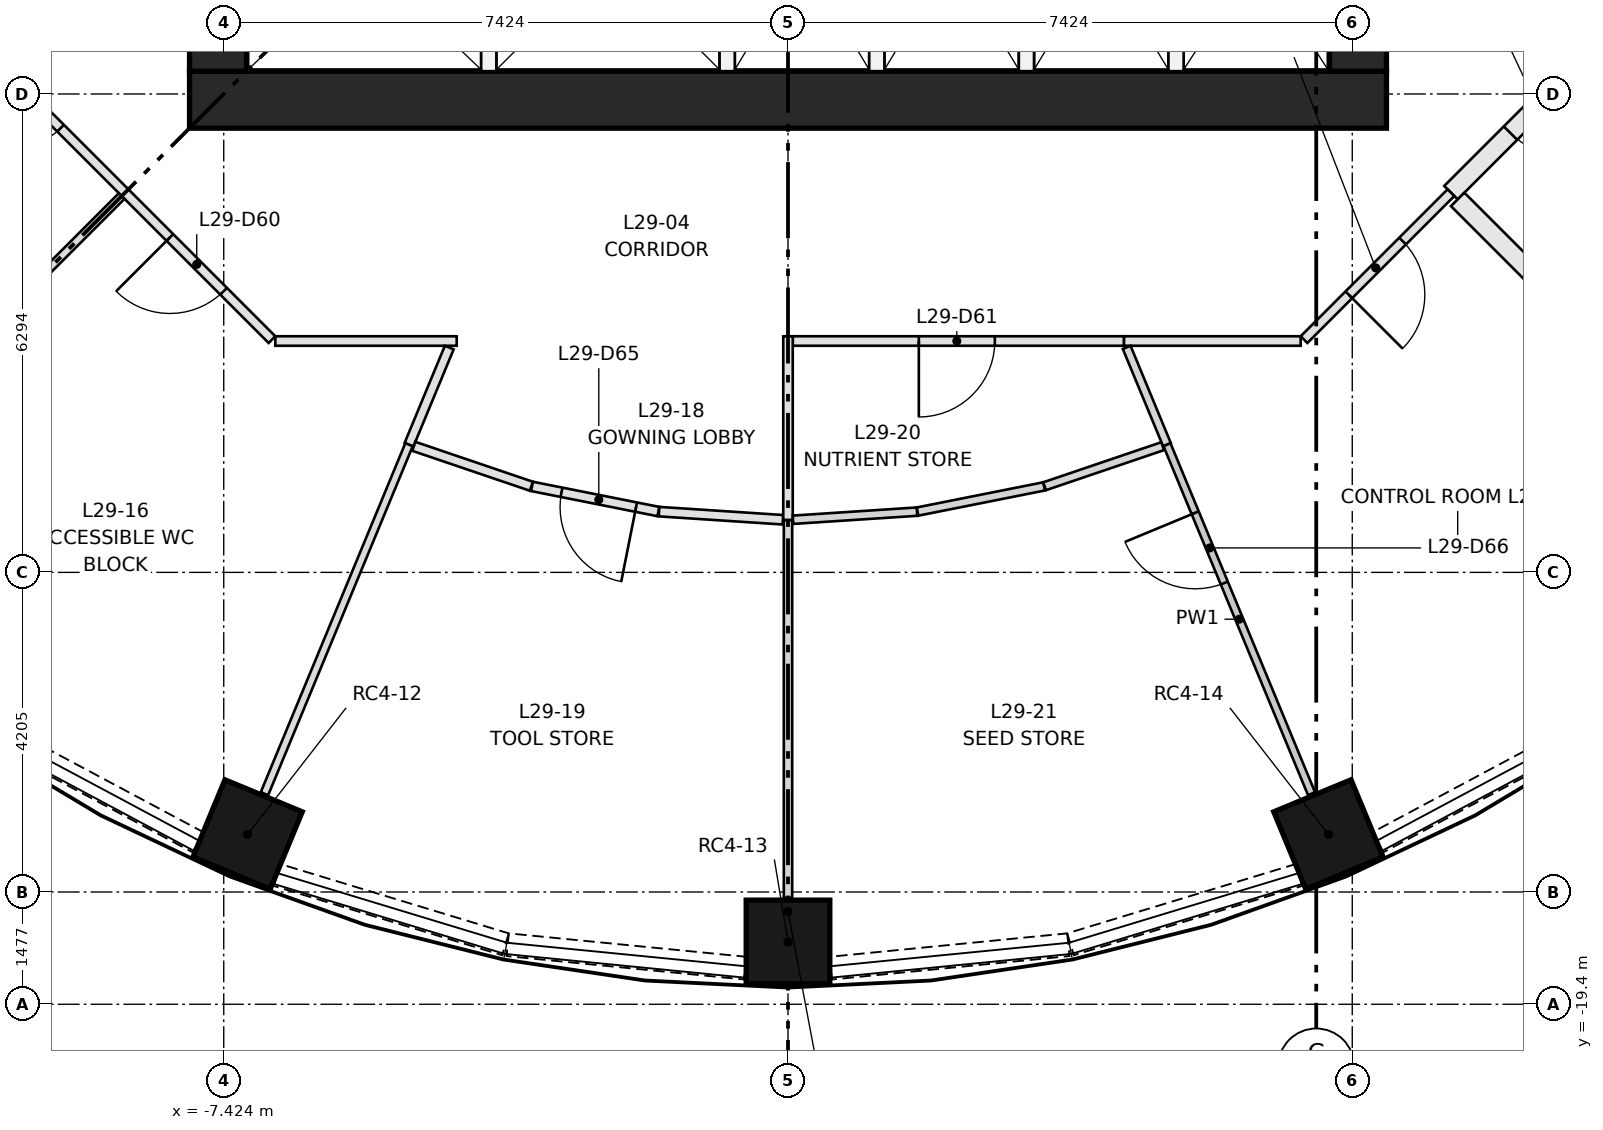
"""IFC4 building model, lengths in metres.
Left out: names, types, materials, properties, quantities, classifications, styles, units other than length and angle.
Written with IfcOpenShell. Run it as: python <this file> out.ifc"""

import sys

from ifc_helpers import new_model, si_unit, direction, frame, frame_2d, origin, origin_2d, place, context, subcontext, project, spatial, rectangle, extrude, element, fill, save


model = new_model("IFC4")
c1 = context("Model", 3, precision=1e-05, world=origin(), true_north=direction((0.0, 1.0)))
c2 = subcontext(c1, "Body", "Model", "MODEL_VIEW")
j1 = project(units=[si_unit("LENGTHUNIT", "METRE"), si_unit("PLANEANGLEUNIT", "RADIAN")], contexts=[c1])
p1 = place(None, origin())
s1 = spatial("IfcSite", under=j1, at=p1, CompositionType="ELEMENT")
p2 = place(p1, origin())
s2 = spatial("IfcBuilding", under=s1, at=p2, CompositionType="ELEMENT")
p3 = place(p2, frame((0.0, 0.0, 112.9)))
s3 = spatial("IfcBuildingStorey", under=s2, at=p3, CompositionType="ELEMENT", Elevation=112.9)
for number, where, z_axis, x_axis in (
    (1, (-7.11, -17.166, 0.0), (0.0, 0.0, 1.0), (-0.383, -0.924, 0.0)),
    (2, (0.0, -18.58, 0.0), (0.0, 0.0, 1.0), (0.0, -1.0, 0.0)),
    (3, (7.11, -17.166, 0.0), (0.0, 0.0, 1.0), (0.383, -0.924, 0.0)),
):
    element("IfcColumn", number, at=place(p3, frame(where, z_axis=z_axis, x_axis=x_axis)), inside=s3, PredefinedType="COLUMN", context=c2, shape_type="SweptSolid", body=[
        extrude(rectangle(XDim=1.1, YDim=1.1, at=origin_2d()), origin(), (0.0, 0.0, 1.0), 3.65),
    ])
p4 = place(p3, frame((-7.874, -7.499, 0.0), z_axis=(0.0, 0.0, 1.0), x_axis=(1.0, 0.0, 0.0)))
e4 = element("IfcWall", 4, at=p4, inside=s3, PredefinedType="SHEAR", context=c2, shape_type="SweptSolid", body=[
    extrude(rectangle(XDim=15.748, YDim=0.75, at=frame_2d((7.874, 0.0))), origin(), (0.0, 0.0, 1.0), 3.65),
])
p5 = place(p3, frame((-7.499, -7.124, 0.0), z_axis=(0.0, 0.0, 1.0), x_axis=(0.0, 1.0, 0.0)))
e5 = element("IfcWall", 5, at=p5, inside=s3, PredefinedType="SHEAR", context=c2, shape_type="SweptSolid", body=[
    extrude(rectangle(XDim=14.248, YDim=0.75, at=frame_2d((7.124, 0.0))), origin(), (0.0, 0.0, 1.0), 3.65),
])
p6 = place(p5, frame((6.624, 0.0, 0.0)))
e6 = element("IfcOpeningElement", 6, at=p6, cuts=e5, PredefinedType="OPENING", context=c2, shape_type="SweptSolid", body=[
    extrude(rectangle(XDim=1.0, YDim=2.1, at=frame_2d((0.5, 1.05))), frame((0.0, 0.385, 0.0), z_axis=(0.0, -1.0, 0.0), x_axis=(1.0, 0.0, 0.0)), (0.0, 0.0, 1.0), 0.77),
])
p7 = place(p5, frame((3.5, 0.0, 0.0)))
e7 = element("IfcOpeningElement", 7, at=p7, cuts=e5, PredefinedType="OPENING", context=c2, shape_type="SweptSolid", body=[
    extrude(rectangle(XDim=1.8, YDim=2.1, at=frame_2d((0.9, 1.05))), frame((0.0, 0.385, 0.0), z_axis=(0.0, -1.0, 0.0), x_axis=(1.0, 0.0, 0.0)), (0.0, 0.0, 1.0), 0.77),
])
p8 = place(p5, frame((8.948, 0.0, 0.0)))
e8 = element("IfcOpeningElement", 8, at=p8, cuts=e5, PredefinedType="OPENING", context=c2, shape_type="SweptSolid", body=[
    extrude(rectangle(XDim=1.8, YDim=2.1, at=frame_2d((0.9, 1.05))), frame((0.0, 0.385, 0.0), z_axis=(0.0, -1.0, 0.0), x_axis=(1.0, 0.0, 0.0)), (0.0, 0.0, 1.0), 0.77),
])
p9 = place(p5, frame((12.124, 0.0, 0.0)))
e9 = element("IfcOpeningElement", 9, at=p9, cuts=e5, PredefinedType="OPENING", context=c2, shape_type="SweptSolid", body=[
    extrude(rectangle(XDim=1.0, YDim=2.1, at=frame_2d((0.5, 1.05))), frame((0.0, 0.385, 0.0), z_axis=(0.0, -1.0, 0.0), x_axis=(1.0, 0.0, 0.0)), (0.0, 0.0, 1.0), 0.77),
])
p10 = place(p3, frame((7.499, -7.124, 0.0), z_axis=(0.0, 0.0, 1.0), x_axis=(0.0, 1.0, 0.0)))
e10 = element("IfcWall", 10, at=p10, inside=s3, PredefinedType="SHEAR", context=c2, shape_type="SweptSolid", body=[
    extrude(rectangle(XDim=14.248, YDim=0.75, at=frame_2d((7.124, 0.0))), origin(), (0.0, 0.0, 1.0), 3.65),
])
p11 = place(p10, frame((6.624, 0.0, 0.0)))
e11 = element("IfcOpeningElement", 11, at=p11, cuts=e10, PredefinedType="OPENING", context=c2, shape_type="SweptSolid", body=[
    extrude(rectangle(XDim=1.0, YDim=2.1, at=frame_2d((0.5, 1.05))), frame((0.0, 0.385, 0.0), z_axis=(0.0, -1.0, 0.0), x_axis=(1.0, 0.0, 0.0)), (0.0, 0.0, 1.0), 0.77),
])
p12 = place(p10, frame((3.5, 0.0, 0.0)))
e12 = element("IfcOpeningElement", 12, at=p12, cuts=e10, PredefinedType="OPENING", context=c2, shape_type="SweptSolid", body=[
    extrude(rectangle(XDim=1.8, YDim=2.1, at=frame_2d((0.9, 1.05))), frame((0.0, 0.385, 0.0), z_axis=(0.0, -1.0, 0.0), x_axis=(1.0, 0.0, 0.0)), (0.0, 0.0, 1.0), 0.77),
])
p13 = place(p10, frame((8.948, 0.0, 0.0)))
e13 = element("IfcOpeningElement", 13, at=p13, cuts=e10, PredefinedType="OPENING", context=c2, shape_type="SweptSolid", body=[
    extrude(rectangle(XDim=1.8, YDim=2.1, at=frame_2d((0.9, 1.05))), frame((0.0, 0.385, 0.0), z_axis=(0.0, -1.0, 0.0), x_axis=(1.0, 0.0, 0.0)), (0.0, 0.0, 1.0), 0.77),
])
for number, where, z_axis, x_axis in (
    (14, (-3.937, -7.124, 0.0), (0.0, 0.0, 1.0), (0.0, 1.0, 0.0)),
    (15, (-0.8, -7.124, 0.0), (0.0, 0.0, 1.0), (0.0, 1.0, 0.0)),
    (16, (1.168, -7.124, 0.0), (0.0, 0.0, 1.0), (0.0, 1.0, 0.0)),
    (17, (3.137, -7.124, 0.0), (0.0, 0.0, 1.0), (0.0, 1.0, 0.0)),
    (18, (5.105, -7.124, 0.0), (0.0, 0.0, 1.0), (0.0, 1.0, 0.0)),
):
    element("IfcWall", number, at=place(p3, frame(where, z_axis=z_axis, x_axis=x_axis)), inside=s3, PredefinedType="PARTITIONING", context=c2, shape_type="SweptSolid", body=[
        extrude(rectangle(XDim=2.95, YDim=0.2, at=frame_2d((1.475, 0.0))), origin(), (0.0, 0.0, 1.0), 3.3),
    ])
p14 = place(p3, frame((-10.532, -15.788, 0.0), z_axis=(0.0, 0.0, 1.0), x_axis=(0.88193278355, -0.471375185282, 0.0)))
e19 = element("IfcWall", 19, at=p14, inside=s3, PredefinedType="SOLIDWALL", context=c2, shape_type="SweptSolid", body=[
    extrude(rectangle(XDim=3.139, YDim=0.3, at=frame_2d((1.57, 0.0))), origin(), (0.0, 0.0, 1.0), 0.9),
])
p15 = place(p3, frame((-6.722, -17.699, 0.0), z_axis=(0.0, 0.0, 1.0), x_axis=(0.956961595403, -0.290214584271, 0.0)))
e20 = element("IfcWall", 20, at=p15, inside=s3, PredefinedType="SOLIDWALL", context=c2, shape_type="SweptSolid", body=[
    extrude(rectangle(XDim=3.139, YDim=0.3, at=frame_2d((1.57, 0.0))), origin(), (0.0, 0.0, 1.0), 0.9),
])
for number, where, z_axis, x_axis in (
    (21, (-3.688, -18.616, 0.0), (0.0, 0.0, 1.0), (0.995, -0.098, 0.0)),
    (22, (0.564, -18.925, 0.0), (0.0, 0.0, 1.0), (0.995, 0.098, 0.0)),
):
    element("IfcWall", number, at=place(p3, frame(where, z_axis=z_axis, x_axis=x_axis)), inside=s3, PredefinedType="SOLIDWALL", context=c2, shape_type="SweptSolid", body=[
        extrude(rectangle(XDim=3.139, YDim=0.3, at=frame_2d((1.57, 0.0))), origin(), (0.0, 0.0, 1.0), 0.9),
    ])
p16 = place(p3, frame((3.717, -18.611, 0.0), z_axis=(0.0, 0.0, 1.0), x_axis=(0.956961595403, 0.290214584271, 0.0)))
e23 = element("IfcWall", 23, at=p16, inside=s3, PredefinedType="SOLIDWALL", context=c2, shape_type="SweptSolid", body=[
    extrude(rectangle(XDim=3.139, YDim=0.3, at=frame_2d((1.57, 0.0))), origin(), (0.0, 0.0, 1.0), 0.9),
])
p17 = place(p3, frame((7.763, -17.268, 0.0), z_axis=(0.0, 0.0, 1.0), x_axis=(0.88193278355, 0.471375185282, 0.0)))
e24 = element("IfcWall", 24, at=p17, inside=s3, PredefinedType="SOLIDWALL", context=c2, shape_type="SweptSolid", body=[
    extrude(rectangle(XDim=3.139, YDim=0.3, at=frame_2d((1.57, 0.0))), origin(), (0.0, 0.0, 1.0), 0.9),
])
p18 = place(p3, frame((10.637, -6.808, 0.0), z_axis=(0.0, 0.0, 1.0), x_axis=(-0.707151855722, -0.707061703777, 0.0)))
e25 = element("IfcWall", 25, at=p18, inside=s3, PredefinedType="PARTITIONING", context=c2, shape_type="SweptSolid", body=[
    extrude(rectangle(XDim=2.708, YDim=0.25, at=frame_2d((1.354, 0.0))), origin(), (0.0, 0.0, 1.0), 3.3),
])
p19 = place(p18, frame((0.6, 0.0, 0.0)))
e26 = element("IfcOpeningElement", 26, at=p19, cuts=e25, PredefinedType="OPENING", context=c2, shape_type="SweptSolid", body=[
    extrude(rectangle(XDim=1.0, YDim=2.1, at=frame_2d((0.5, 1.05))), frame((0.0, 0.135, 0.0), z_axis=(0.0, -1.0, 0.0), x_axis=(1.0, 0.0, 0.0)), (0.0, 0.0, 1.0), 0.27),
])
p20 = place(p3, frame((-8.722, -8.722, 0.0), z_axis=(0.0, 0.0, 1.0), x_axis=(-0.707151428813, 0.707062130741, 0.0)))
e27 = element("IfcWall", 27, at=p20, inside=s3, PredefinedType="PARTITIONING", context=c2, shape_type="SweptSolid", body=[
    extrude(rectangle(XDim=2.734, YDim=0.125, at=frame_2d((1.367, 0.0))), origin(), (0.0, 0.0, 1.0), 3.3),
])
p21 = place(p20, frame((1.2, 0.0, 0.0)))
e28 = element("IfcOpeningElement", 28, at=p21, cuts=e27, PredefinedType="OPENING", context=c2, shape_type="SweptSolid", body=[
    extrude(rectangle(XDim=1.0, YDim=2.1, at=frame_2d((0.5, 1.05))), frame((0.0, 0.073, 0.0), z_axis=(0.0, -1.0, 0.0), x_axis=(1.0, 0.0, 0.0)), (0.0, 0.0, 1.0), 0.145),
])
p22 = place(p3, frame((-6.789, -10.656, 0.0), z_axis=(0.0, 0.0, 1.0), x_axis=(-0.707062130741, 0.707151428813, 0.0)))
e29 = element("IfcWall", 29, at=p22, inside=s3, PredefinedType="PARTITIONING", context=c2, shape_type="SweptSolid", body=[
    extrude(rectangle(XDim=2.734, YDim=0.125, at=frame_2d((1.367, 0.0))), origin(), (0.0, 0.0, 1.0), 3.3),
])
p23 = place(p22, frame((0.9, 0.0, 0.0)))
e30 = element("IfcOpeningElement", 30, at=p23, cuts=e29, PredefinedType="OPENING", context=c2, shape_type="SweptSolid", body=[
    extrude(rectangle(XDim=1.0, YDim=2.1, at=frame_2d((0.5, 1.05))), frame((0.0, 0.073, 0.0), z_axis=(0.0, -1.0, 0.0), x_axis=(1.0, 0.0, 0.0)), (0.0, 0.0, 1.0), 0.145),
])
p24 = place(p3, frame((-4.359, -10.674, 0.0), z_axis=(0.0, 0.0, 1.0), x_axis=(-1.0, 0.0, 0.0)))
e31 = element("IfcWall", 31, at=p24, inside=s3, PredefinedType="PARTITIONING", context=c2, shape_type="SweptSolid", body=[
    extrude(rectangle(XDim=2.386, YDim=0.125, at=frame_2d((1.193, 0.0))), origin(), (0.0, 0.0, 1.0), 3.3),
])
p25 = place(p3, frame((4.421, -10.674, 0.0), z_axis=(0.0, 0.0, 1.0), x_axis=(-1.0, 0.0, 0.0)))
e32 = element("IfcWall", 32, at=p25, inside=s3, PredefinedType="PARTITIONING", context=c2, shape_type="SweptSolid", body=[
    extrude(rectangle(XDim=4.359, YDim=0.125, at=frame_2d((2.179, 0.0))), origin(), (0.0, 0.0, 1.0), 3.3),
])
p26 = place(p25, frame((1.7, 0.0, 0.0)))
e33 = element("IfcOpeningElement", 33, at=p26, cuts=e32, PredefinedType="OPENING", context=c2, shape_type="SweptSolid", body=[
    extrude(rectangle(XDim=1.0, YDim=2.1, at=frame_2d((0.5, 1.05))), frame((0.0, 0.073, 0.0), z_axis=(0.0, -1.0, 0.0), x_axis=(1.0, 0.0, 0.0)), (0.0, 0.0, 1.0), 0.145),
])
p27 = place(p3, frame((6.745, -10.674, 0.0), z_axis=(0.0, 0.0, 1.0), x_axis=(-1.0, 0.0, 0.0)))
e34 = element("IfcWall", 34, at=p27, inside=s3, PredefinedType="PARTITIONING", context=c2, shape_type="SweptSolid", body=[
    extrude(rectangle(XDim=2.324, YDim=0.125, at=frame_2d((1.162, 0.0))), origin(), (0.0, 0.0, 1.0), 3.3),
])
p28 = place(p3, frame((8.722, -8.722, 0.0), z_axis=(0.0, 0.0, 1.0), x_axis=(-0.707062130741, -0.707151428813, 0.0)))
e35 = element("IfcWall", 35, at=p28, inside=s3, PredefinedType="PARTITIONING", context=c2, shape_type="SweptSolid", body=[
    extrude(rectangle(XDim=2.734, YDim=0.125, at=frame_2d((1.367, 0.0))), origin(), (0.0, 0.0, 1.0), 3.3),
])
p29 = place(p28, frame((0.9, 0.0, 0.0)))
e36 = element("IfcOpeningElement", 36, at=p29, cuts=e35, PredefinedType="OPENING", context=c2, shape_type="SweptSolid", body=[
    extrude(rectangle(XDim=1.0, YDim=2.1, at=frame_2d((0.5, 1.05))), frame((0.0, 0.073, 0.0), z_axis=(0.0, -1.0, 0.0), x_axis=(1.0, 0.0, 0.0)), (0.0, 0.0, 1.0), 0.145),
])
p30 = place(p3, frame((-12.728, -12.728, 0.0), z_axis=(0.0, 0.0, 1.0), x_axis=(0.707106781187, 0.707106781187, 0.0)))
e37 = element("IfcWall", 37, at=p30, inside=s3, PredefinedType="PARTITIONING", context=c2, shape_type="SweptSolid", body=[
    extrude(rectangle(XDim=5.602, YDim=0.105, at=frame_2d((2.801, 0.0))), origin(), (0.0, 0.0, 1.0), 3.3),
])
p31 = place(p3, frame((-4.457, -10.76, 0.0), z_axis=(0.0, 0.0, 1.0), x_axis=(-0.382746785562, -0.923853288213, 0.0)))
e38 = element("IfcWall", 38, at=p31, inside=s3, PredefinedType="PARTITIONING", context=c2, shape_type="SweptSolid", body=[
    extrude(rectangle(XDim=1.383, YDim=0.125, at=frame_2d((0.691, 0.0))), origin(), (0.0, 0.0, 1.0), 3.3),
])
p32 = place(p3, frame((-4.986, -12.038, 0.0), z_axis=(0.0, 0.0, 1.0), x_axis=(-0.38266126553, -0.923888714003, 0.0)))
e39 = element("IfcWall", 39, at=p32, inside=s3, PredefinedType="PARTITIONING", context=c2, shape_type="SweptSolid", body=[
    extrude(rectangle(XDim=4.97, YDim=0.105, at=frame_2d((2.485, 0.0))), origin(), (0.0, 0.0, 1.0), 3.3),
])
p33 = place(p3, frame((-3.376, -12.585, 0.0), z_axis=(0.0, 0.0, 1.0), x_axis=(-0.946920220616, 0.321468654442, 0.0)))
e40 = element("IfcWall", 40, at=p33, inside=s3, PredefinedType="PARTITIONING", context=c2, shape_type="SweptSolid", body=[
    extrude(rectangle(XDim=1.634, YDim=0.125, at=frame_2d((0.817, 0.0))), origin(), (0.0, 0.0, 1.0), 3.3),
])
p34 = place(p3, frame((-1.705, -12.918, 0.0), z_axis=(0.0, 0.0, 1.0), x_axis=(-0.980795988991, 0.195036478586, 0.0)))
e41 = element("IfcWall", 41, at=p34, inside=s3, PredefinedType="PARTITIONING", context=c2, shape_type="SweptSolid", body=[
    extrude(rectangle(XDim=1.696, YDim=0.125, at=frame_2d((0.848, 0.0))), origin(), (0.0, 0.0, 1.0), 3.3),
])
p35 = place(p34, frame((0.3, 0.0, 0.0)))
e42 = element("IfcOpeningElement", 42, at=p35, cuts=e41, PredefinedType="OPENING", context=c2, shape_type="SweptSolid", body=[
    extrude(rectangle(XDim=1.0, YDim=2.1, at=frame_2d((0.5, 1.05))), frame((0.0, 0.073, 0.0), z_axis=(0.0, -1.0, 0.0), x_axis=(1.0, 0.0, 0.0)), (0.0, 0.0, 1.0), 0.145),
])
p36 = place(p3, frame((-0.067, -13.026, 0.0), z_axis=(0.0, 0.0, 1.0), x_axis=(-0.997855349109, 0.065457637099, 0.0)))
e43 = element("IfcWall", 43, at=p36, inside=s3, PredefinedType="PARTITIONING", context=c2, shape_type="SweptSolid", body=[
    extrude(rectangle(XDim=1.634, YDim=0.125, at=frame_2d((0.817, 0.0))), origin(), (0.0, 0.0, 1.0), 3.3),
])
p37 = place(p3, frame((0.0, -10.612, 0.0), z_axis=(0.0, 0.0, 1.0), x_axis=(0.0, -1.0, 0.0)))
e44 = element("IfcWall", 44, at=p37, inside=s3, PredefinedType="PARTITIONING", context=c2, shape_type="SweptSolid", body=[
    extrude(rectangle(XDim=2.418, YDim=0.125, at=frame_2d((1.209, 0.0))), origin(), (0.0, 0.0, 1.0), 3.3),
])
p38 = place(p3, frame((0.0, -13.03, 0.0), z_axis=(0.0, 0.0, 1.0), x_axis=(0.0, -1.0, 0.0)))
e45 = element("IfcWall", 45, at=p38, inside=s3, PredefinedType="PARTITIONING", context=c2, shape_type="SweptSolid", body=[
    extrude(rectangle(XDim=4.97, YDim=0.11, at=frame_2d((2.485, 0.0))), origin(), (0.0, 0.0, 1.0), 3.3),
])
p39 = place(p3, frame((1.697, -12.919, 0.0), z_axis=(0.0, 0.0, 1.0), x_axis=(-0.997857908157, -0.065418614545, 0.0)))
e46 = element("IfcWall", 46, at=p39, inside=s3, PredefinedType="PARTITIONING", context=c2, shape_type="SweptSolid", body=[
    extrude(rectangle(XDim=1.635, YDim=0.11, at=frame_2d((0.817, 0.0))), origin(), (0.0, 0.0, 1.0), 3.3),
])
p40 = place(p3, frame((3.369, -12.587, 0.0), z_axis=(0.0, 0.0, 1.0), x_axis=(-0.980790359024, -0.19506478833, 0.0)))
e47 = element("IfcWall", 47, at=p40, inside=s3, PredefinedType="PARTITIONING", context=c2, shape_type="SweptSolid", body=[
    extrude(rectangle(XDim=1.697, YDim=0.11, at=frame_2d((0.849, 0.0))), origin(), (0.0, 0.0, 1.0), 3.3),
])
p41 = place(p3, frame((4.931, -12.057, 0.0), z_axis=(0.0, 0.0, 1.0), x_axis=(-0.946990007889, -0.321263015235, 0.0)))
e48 = element("IfcWall", 48, at=p41, inside=s3, PredefinedType="PARTITIONING", context=c2, shape_type="SweptSolid", body=[
    extrude(rectangle(XDim=1.642, YDim=0.11, at=frame_2d((0.821, 0.0))), origin(), (0.0, 0.0, 1.0), 3.3),
])
p42 = place(p3, frame((4.456, -10.758, 0.0), z_axis=(0.0, 0.0, 1.0), x_axis=(0.382751066095, -0.923851514803, 0.0)))
e49 = element("IfcWall", 49, at=p42, inside=s3, PredefinedType="PARTITIONING", context=c2, shape_type="SweptSolid", body=[
    extrude(rectangle(XDim=1.386, YDim=0.11, at=frame_2d((0.693, 0.0))), origin(), (0.0, 0.0, 1.0), 3.3),
])
p43 = place(p3, frame((6.888, -16.63, 0.0), z_axis=(0.0, 0.0, 1.0), x_axis=(-0.38266126553, 0.923888714003, 0.0)))
e50 = element("IfcWall", 50, at=p43, inside=s3, PredefinedType="PARTITIONING", context=c2, shape_type="SweptSolid", body=[
    extrude(rectangle(XDim=4.97, YDim=0.1, at=frame_2d((2.485, 0.0))), origin(), (0.0, 0.0, 1.0), 3.3),
])
p44 = place(p43, frame((3.0, 0.0, 0.0)))
e51 = element("IfcOpeningElement", 51, at=p44, cuts=e50, PredefinedType="OPENING", context=c2, shape_type="SweptSolid", body=[
    extrude(rectangle(XDim=1.0, YDim=2.1, at=frame_2d((0.5, 1.05))), frame((0.0, 0.06, 0.0), z_axis=(0.0, -1.0, 0.0), x_axis=(1.0, 0.0, 0.0)), (0.0, 0.0, 1.0), 0.12),
])
p45 = place(p3, frame((8.811, -8.811, 0.0), z_axis=(0.0, 0.0, 1.0), x_axis=(0.707106781187, -0.707106781187, 0.0)))
e52 = element("IfcWall", 52, at=p45, inside=s3, PredefinedType="PARTITIONING", context=c2, shape_type="SweptSolid", body=[
    extrude(rectangle(XDim=5.54, YDim=0.25, at=frame_2d((2.77, 0.0))), origin(), (0.0, 0.0, 1.0), 3.3),
])
p46 = place(p19, origin())
e53 = element("IfcDoor", 53, at=p46, inside=s3, OperationType="SINGLE_SWING_LEFT", PredefinedType="DOOR", context=c2, shape_type="SweptSolid", body=[
    extrude(rectangle(XDim=1.0, YDim=2.1, at=frame_2d((0.5, 1.05))), frame((0.0, 0.025, 0.0), z_axis=(0.0, -1.0, 0.0), x_axis=(1.0, 0.0, 0.0)), (0.0, 0.0, 1.0), 0.05),
])
fill(e26, e53)
p47 = place(p21, origin())
e54 = element("IfcDoor", 54, at=p47, inside=s3, OperationType="SINGLE_SWING_RIGHT", PredefinedType="DOOR", context=c2, shape_type="SweptSolid", body=[
    extrude(rectangle(XDim=1.0, YDim=2.1, at=frame_2d((0.5, 1.05))), frame((0.0, 0.025, 0.0), z_axis=(0.0, -1.0, 0.0), x_axis=(1.0, 0.0, 0.0)), (0.0, 0.0, 1.0), 0.05),
])
fill(e28, e54)
p48 = place(p23, origin())
e55 = element("IfcDoor", 55, at=p48, inside=s3, OperationType="SINGLE_SWING_RIGHT", PredefinedType="DOOR", context=c2, shape_type="SweptSolid", body=[
    extrude(rectangle(XDim=1.0, YDim=2.1, at=frame_2d((0.5, 1.05))), frame((0.0, 0.025, 0.0), z_axis=(0.0, -1.0, 0.0), x_axis=(1.0, 0.0, 0.0)), (0.0, 0.0, 1.0), 0.05),
])
fill(e30, e55)
p49 = place(p26, origin())
e56 = element("IfcDoor", 56, at=p49, inside=s3, OperationType="SINGLE_SWING_RIGHT", PredefinedType="DOOR", context=c2, shape_type="SweptSolid", body=[
    extrude(rectangle(XDim=1.0, YDim=2.1, at=frame_2d((0.5, 1.05))), frame((0.0, 0.025, 0.0), z_axis=(0.0, -1.0, 0.0), x_axis=(1.0, 0.0, 0.0)), (0.0, 0.0, 1.0), 0.05),
])
fill(e33, e56)
p50 = place(p29, origin())
e57 = element("IfcDoor", 57, at=p50, inside=s3, OperationType="SINGLE_SWING_RIGHT", PredefinedType="DOOR", context=c2, shape_type="SweptSolid", body=[
    extrude(rectangle(XDim=1.0, YDim=2.1, at=frame_2d((0.5, 1.05))), frame((0.0, 0.025, 0.0), z_axis=(0.0, -1.0, 0.0), x_axis=(1.0, 0.0, 0.0)), (0.0, 0.0, 1.0), 0.05),
])
fill(e36, e57)
p51 = place(p35, origin())
e58 = element("IfcDoor", 58, at=p51, inside=s3, OperationType="SINGLE_SWING_LEFT", PredefinedType="DOOR", context=c2, shape_type="SweptSolid", body=[
    extrude(rectangle(XDim=1.0, YDim=2.1, at=frame_2d((0.5, 1.05))), frame((0.0, 0.025, 0.0), z_axis=(0.0, -1.0, 0.0), x_axis=(1.0, 0.0, 0.0)), (0.0, 0.0, 1.0), 0.05),
])
fill(e42, e58)
p52 = place(p44, origin())
e59 = element("IfcDoor", 59, at=p52, inside=s3, OperationType="SINGLE_SWING_RIGHT", PredefinedType="DOOR", context=c2, shape_type="SweptSolid", body=[
    extrude(rectangle(XDim=1.0, YDim=2.1, at=frame_2d((0.5, 1.05))), frame((0.0, 0.025, 0.0), z_axis=(0.0, -1.0, 0.0), x_axis=(1.0, 0.0, 0.0)), (0.0, 0.0, 1.0), 0.05),
])
fill(e51, e59)
save(model, sys.argv[1])
